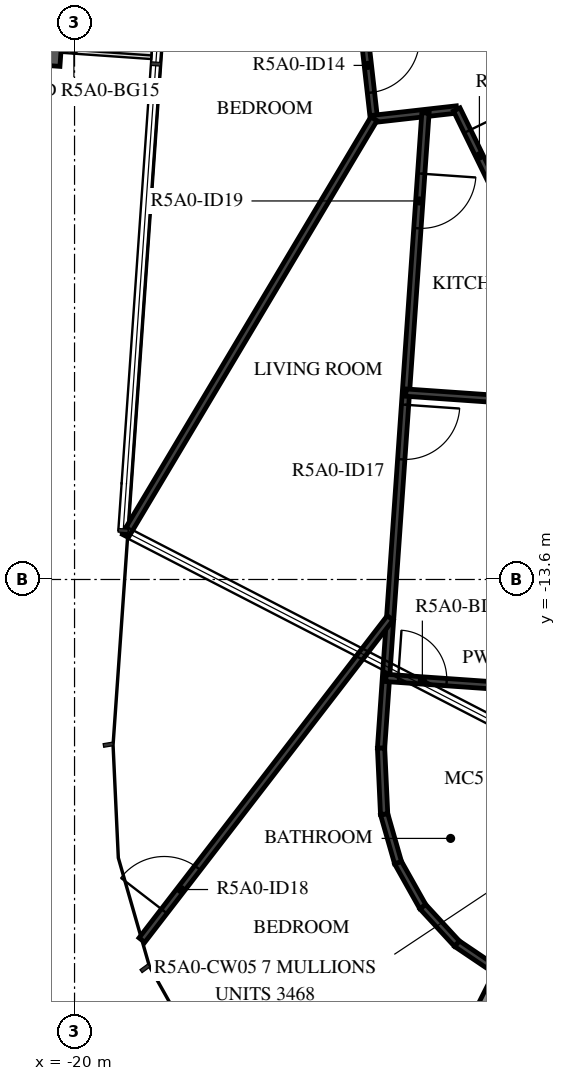
"""IFC4 building model, lengths in metres.
Left out: names, types, materials, properties, quantities, classifications, styles, units other than length and angle.
Written with IfcOpenShell. Run it as: python <this file> out.ifc"""

import sys

from ifc_helpers import new_model, si_unit, direction, frame, frame_2d, origin, origin_2d, place, context, subcontext, project, spatial, rectangle, i_section, extrude, element, fill, save


model = new_model("IFC4")
c1 = context("Model", 3, precision=1e-05, world=origin(), true_north=direction((0.0, 1.0)))
c2 = subcontext(c1, "Body", "Model", "MODEL_VIEW")
j1 = project(units=[si_unit("LENGTHUNIT", "METRE"), si_unit("PLANEANGLEUNIT", "RADIAN")], contexts=[c1])
p1 = place(None, origin())
s1 = spatial("IfcSite", under=j1, at=p1, CompositionType="ELEMENT")
p2 = place(p1, origin())
s2 = spatial("IfcBuilding", under=s1, at=p2, CompositionType="ELEMENT")
p3 = place(p2, frame((0.0, 0.0, 195.4)))
s3 = spatial("IfcBuildingStorey", under=s2, at=p3, CompositionType="ELEMENT", Elevation=195.4)
p4 = place(p3, frame((-20.679, -4.981, -0.38), z_axis=(0.0, 0.0, 1.0), x_axis=(0.069756005795, 0.997564082982, 0.0)))
e1 = element("IfcColumn", 1, at=p4, inside=s3, PredefinedType="COLUMN", context=c2, shape_type="SweptSolid", body=[
    extrude(i_section(OverallWidth=0.3, OverallDepth=0.9, WebThickness=0.019, FlangeThickness=0.035, FilletRadius=0.03, at=origin_2d()), origin(), (0.0, 0.0, 1.0), 3.5),
])
p5 = place(p3, frame((-14.979, -24.017, 0.0), z_axis=(0.0, 0.0, 1.0), x_axis=(0.449711952388, 0.893173644864, 0.0)))
e2 = element("IfcWall", 2, at=p5, inside=s3, PredefinedType="STANDARD", context=c2, shape_type="SweptSolid", body=[
    extrude(rectangle(XDim=6.367, YDim=0.2, at=frame_2d((3.184, 0.0))), origin(), (0.0, 0.0, 1.0), 2.73),
])
p6 = place(p3, frame((-15.25, -4.5, 0.0), z_axis=(0.0, 0.0, 1.0), x_axis=(0.1124919794, -0.99365263275, 0.0)))
e3 = element("IfcWall", 3, at=p6, inside=s3, PredefinedType="PARTITIONING", context=c2, shape_type="SweptSolid", body=[
    extrude(rectangle(XDim=1.534, YDim=0.12, at=frame_2d((0.767, 0.0))), origin(), (0.0, 0.0, 1.0), 3.12),
])
p7 = place(p6, frame((0.2, 0.0, 0.0)))
e4 = element("IfcOpeningElement", 4, at=p7, cuts=e3, PredefinedType="OPENING", context=c2, shape_type="SweptSolid", body=[
    extrude(rectangle(XDim=0.9, YDim=2.1, at=frame_2d((0.45, 1.05))), frame((0.0, 0.07, 0.0), z_axis=(0.0, -1.0, 0.0), x_axis=(1.0, 0.0, 0.0)), (0.0, 0.0, 1.0), 0.14),
])
p8 = place(p3, frame((-15.077, -6.025, 0.0), z_axis=(0.0, 0.0, 1.0), x_axis=(0.993646958109, 0.112542092746, 0.0)))
e5 = element("IfcWall", 5, at=p8, inside=s3, PredefinedType="PARTITIONING", context=c2, shape_type="SweptSolid", body=[
    extrude(rectangle(XDim=1.371, YDim=0.12, at=frame_2d((0.686, 0.0))), origin(), (0.0, 0.0, 1.0), 3.12),
])
p9 = place(p3, frame((-13.715, -5.87, 0.0), z_axis=(0.0, 0.0, 1.0), x_axis=(0.438372766482, -0.89879325632, 0.0)))
e6 = element("IfcWall", 6, at=p9, inside=s3, PredefinedType="PARTITIONING", context=c2, shape_type="SweptSolid", body=[
    extrude(rectangle(XDim=4.728, YDim=0.12, at=frame_2d((2.364, 0.0))), origin(), (0.0, 0.0, 1.0), 3.12),
])
p10 = place(p9, frame((0.4, 0.0, 0.0)))
e7 = element("IfcOpeningElement", 7, at=p10, cuts=e6, PredefinedType="OPENING", context=c2, shape_type="SweptSolid", body=[
    extrude(rectangle(XDim=0.9, YDim=2.1, at=frame_2d((0.45, 1.05))), frame((0.0, 0.07, 0.0), z_axis=(0.0, -1.0, 0.0), x_axis=(1.0, 0.0, 0.0)), (0.0, 0.0, 1.0), 0.14),
])
p11 = place(p3, frame((-19.156, -12.863, 0.0), z_axis=(0.0, 0.0, 1.0), x_axis=(0.512316386407, 0.858796786335, 0.0)))
e8 = element("IfcWall", 8, at=p11, inside=s3, PredefinedType="PARTITIONING", context=c2, shape_type="SweptSolid", body=[
    extrude(rectangle(XDim=7.963, YDim=0.12, at=frame_2d((3.981, 0.0))), origin(), (0.0, 0.0, 1.0), 3.12),
])
p12 = place(p3, frame((-14.229, -5.929, 0.0), z_axis=(0.0, 0.0, 1.0), x_axis=(-0.069740723375, -0.997565151508, 0.0)))
e9 = element("IfcWall", 9, at=p12, inside=s3, PredefinedType="PARTITIONING", context=c2, shape_type="SweptSolid", body=[
    extrude(rectangle(XDim=10.47, YDim=0.12, at=frame_2d((5.235, 0.0))), origin(), (0.0, 0.0, 1.0), 3.12),
])
p13 = place(p12, frame((4.809, 0.0, 0.0)))
e10 = element("IfcOpeningElement", 10, at=p13, cuts=e9, PredefinedType="OPENING", context=c2, shape_type="SweptSolid", body=[
    extrude(rectangle(XDim=0.9, YDim=2.1, at=frame_2d((0.45, 1.05))), frame((0.0, 0.07, 0.0), z_axis=(0.0, -1.0, 0.0), x_axis=(1.0, 0.0, 0.0)), (0.0, 0.0, 1.0), 0.14),
])
p14 = place(p12, frame((1.0, 0.0, 0.0)))
e11 = element("IfcOpeningElement", 11, at=p14, cuts=e9, PredefinedType="OPENING", context=c2, shape_type="SweptSolid", body=[
    extrude(rectangle(XDim=0.9, YDim=2.1, at=frame_2d((0.45, 1.05))), frame((0.0, 0.07, 0.0), z_axis=(0.0, -1.0, 0.0), x_axis=(1.0, 0.0, 0.0)), (0.0, 0.0, 1.0), 0.14),
])
p15 = place(p3, frame((-14.551, -10.527, 0.0), z_axis=(0.0, 0.0, 1.0), x_axis=(0.997564247633, -0.069753651118, 0.0)))
e12 = element("IfcWall", 12, at=p15, inside=s3, PredefinedType="PARTITIONING", context=c2, shape_type="SweptSolid", body=[
    extrude(rectangle(XDim=3.927, YDim=0.12, at=frame_2d((1.963, 0.0))), origin(), (0.0, 0.0, 1.0), 3.12),
])
p16 = place(p3, frame((-18.892, -19.531, 0.0), z_axis=(0.0, 0.0, 1.0), x_axis=(0.610326128317, 0.792150249065, 0.0)))
e13 = element("IfcWall", 13, at=p16, inside=s3, PredefinedType="PARTITIONING", context=c2, shape_type="SweptSolid", body=[
    extrude(rectangle(XDim=6.689, YDim=0.12, at=frame_2d((3.345, 0.0))), origin(), (0.0, 0.0, 1.0), 3.12),
])
p17 = place(p16, frame((0.6, 0.0, 0.0)))
e14 = element("IfcOpeningElement", 14, at=p17, cuts=e13, PredefinedType="OPENING", context=c2, shape_type="SweptSolid", body=[
    extrude(rectangle(XDim=0.9, YDim=2.1, at=frame_2d((0.45, 1.05))), frame((0.0, 0.07, 0.0), z_axis=(0.0, -1.0, 0.0), x_axis=(1.0, 0.0, 0.0)), (0.0, 0.0, 1.0), 0.14),
])
p18 = place(p3, frame((-14.879, -15.219, 0.0), z_axis=(0.0, 0.0, 1.0), x_axis=(0.997566012813, -0.069728402248, 0.0)))
e15 = element("IfcWall", 15, at=p18, inside=s3, PredefinedType="PARTITIONING", context=c2, shape_type="SweptSolid", body=[
    extrude(rectangle(XDim=3.039, YDim=0.12, at=frame_2d((1.52, 0.0))), origin(), (0.0, 0.0, 1.0), 3.12),
])
p19 = place(p18, frame((0.2, 0.0, 0.0)))
e16 = element("IfcOpeningElement", 16, at=p19, cuts=e15, PredefinedType="OPENING", context=c2, shape_type="SweptSolid", body=[
    extrude(rectangle(XDim=0.8, YDim=2.1, at=frame_2d((0.4, 1.05))), frame((0.0, 0.07, 0.0), z_axis=(0.0, -1.0, 0.0), x_axis=(1.0, 0.0, 0.0)), (0.0, 0.0, 1.0), 0.14),
])
for number, where, z_axis, x_axis in (
    (17, (-13.025, -20.052, 0.0), (0.0, 0.0, 1.0), (-0.829, 0.559, 0.0)),
    (18, (-13.712, -19.588, 0.0), (0.0, 0.0, 1.0), (-0.678, 0.735, 0.0)),
):
    element("IfcWall", number, at=place(p3, frame(where, z_axis=z_axis, x_axis=x_axis)), inside=s3, PredefinedType="PARTITIONING", context=c2, shape_type="SweptSolid", body=[
        extrude(rectangle(XDim=0.829, YDim=0.12, at=frame_2d((0.415, 0.0))), origin(), (0.0, 0.0, 1.0), 3.12),
    ])
p20 = place(p3, frame((-14.274, -18.979, 0.0), z_axis=(0.0, 0.0, 1.0), x_axis=(-0.490037513137, 0.871701345484, 0.0)))
e19 = element("IfcWall", 19, at=p20, inside=s3, PredefinedType="PARTITIONING", context=c2, shape_type="SweptSolid", body=[
    extrude(rectangle(XDim=0.829, YDim=0.12, at=frame_2d((0.415, 0.0))), origin(), (0.0, 0.0, 1.0), 3.12),
])
p21 = place(p3, frame((-14.68, -18.256, 0.0), z_axis=(0.0, 0.0, 1.0), x_axis=(-0.275382358468, 0.961334778651, 0.0)))
e20 = element("IfcWall", 20, at=p21, inside=s3, PredefinedType="PARTITIONING", context=c2, shape_type="SweptSolid", body=[
    extrude(rectangle(XDim=0.829, YDim=0.12, at=frame_2d((0.415, 0.0))), origin(), (0.0, 0.0, 1.0), 3.12),
])
p22 = place(p3, frame((-14.909, -17.459, 0.0), z_axis=(0.0, 0.0, 1.0), x_axis=(-0.046497887649, 0.99891838828, 0.0)))
e21 = element("IfcWall", 21, at=p22, inside=s3, PredefinedType="PARTITIONING", context=c2, shape_type="SweptSolid", body=[
    extrude(rectangle(XDim=1.087, YDim=0.12, at=frame_2d((0.543, 0.0))), origin(), (0.0, 0.0, 1.0), 3.12),
])
p23 = place(p7, origin())
e22 = element("IfcDoor", 22, at=p23, inside=s3, OperationType="SINGLE_SWING_RIGHT", PredefinedType="DOOR", context=c2, shape_type="SweptSolid", body=[
    extrude(rectangle(XDim=0.9, YDim=2.1, at=frame_2d((0.45, 1.05))), frame((0.0, 0.025, 0.0), z_axis=(0.0, -1.0, 0.0), x_axis=(1.0, 0.0, 0.0)), (0.0, 0.0, 1.0), 0.05),
])
fill(e4, e22)
p24 = place(p10, origin())
e23 = element("IfcDoor", 23, at=p24, inside=s3, OperationType="SINGLE_SWING_RIGHT", PredefinedType="DOOR", context=c2, shape_type="SweptSolid", body=[
    extrude(rectangle(XDim=0.9, YDim=2.1, at=frame_2d((0.45, 1.05))), frame((0.0, 0.025, 0.0), z_axis=(0.0, -1.0, 0.0), x_axis=(1.0, 0.0, 0.0)), (0.0, 0.0, 1.0), 0.05),
])
fill(e7, e23)
p25 = place(p13, origin())
e24 = element("IfcDoor", 24, at=p25, inside=s3, OperationType="SINGLE_SWING_RIGHT", PredefinedType="DOOR", context=c2, shape_type="SweptSolid", body=[
    extrude(rectangle(XDim=0.9, YDim=2.1, at=frame_2d((0.45, 1.05))), frame((0.0, 0.025, 0.0), z_axis=(0.0, -1.0, 0.0), x_axis=(1.0, 0.0, 0.0)), (0.0, 0.0, 1.0), 0.05),
])
fill(e10, e24)
p26 = place(p19, origin())
e25 = element("IfcDoor", 25, at=p26, inside=s3, OperationType="SINGLE_SWING_RIGHT", PredefinedType="DOOR", context=c2, shape_type="SweptSolid", body=[
    extrude(rectangle(XDim=0.8, YDim=2.1, at=frame_2d((0.4, 1.05))), frame((0.0, 0.025, 0.0), z_axis=(0.0, -1.0, 0.0), x_axis=(1.0, 0.0, 0.0)), (0.0, 0.0, 1.0), 0.05),
])
fill(e16, e25)
p27 = place(p17, origin())
e26 = element("IfcDoor", 26, at=p27, inside=s3, OperationType="SINGLE_SWING_RIGHT", PredefinedType="DOOR", context=c2, shape_type="SweptSolid", body=[
    extrude(rectangle(XDim=0.9, YDim=2.1, at=frame_2d((0.45, 1.05))), frame((0.0, 0.025, 0.0), z_axis=(0.0, -1.0, 0.0), x_axis=(1.0, 0.0, 0.0)), (0.0, 0.0, 1.0), 0.05),
])
fill(e14, e26)
p28 = place(p14, origin())
e27 = element("IfcDoor", 27, at=p28, inside=s3, OperationType="SINGLE_SWING_LEFT", PredefinedType="DOOR", context=c2, shape_type="SweptSolid", body=[
    extrude(rectangle(XDim=0.9, YDim=2.1, at=frame_2d((0.45, 1.05))), frame((0.0, 0.025, 0.0), z_axis=(0.0, -1.0, 0.0), x_axis=(1.0, 0.0, 0.0)), (0.0, 0.0, 1.0), 0.05),
])
fill(e11, e27)
save(model, sys.argv[1])
